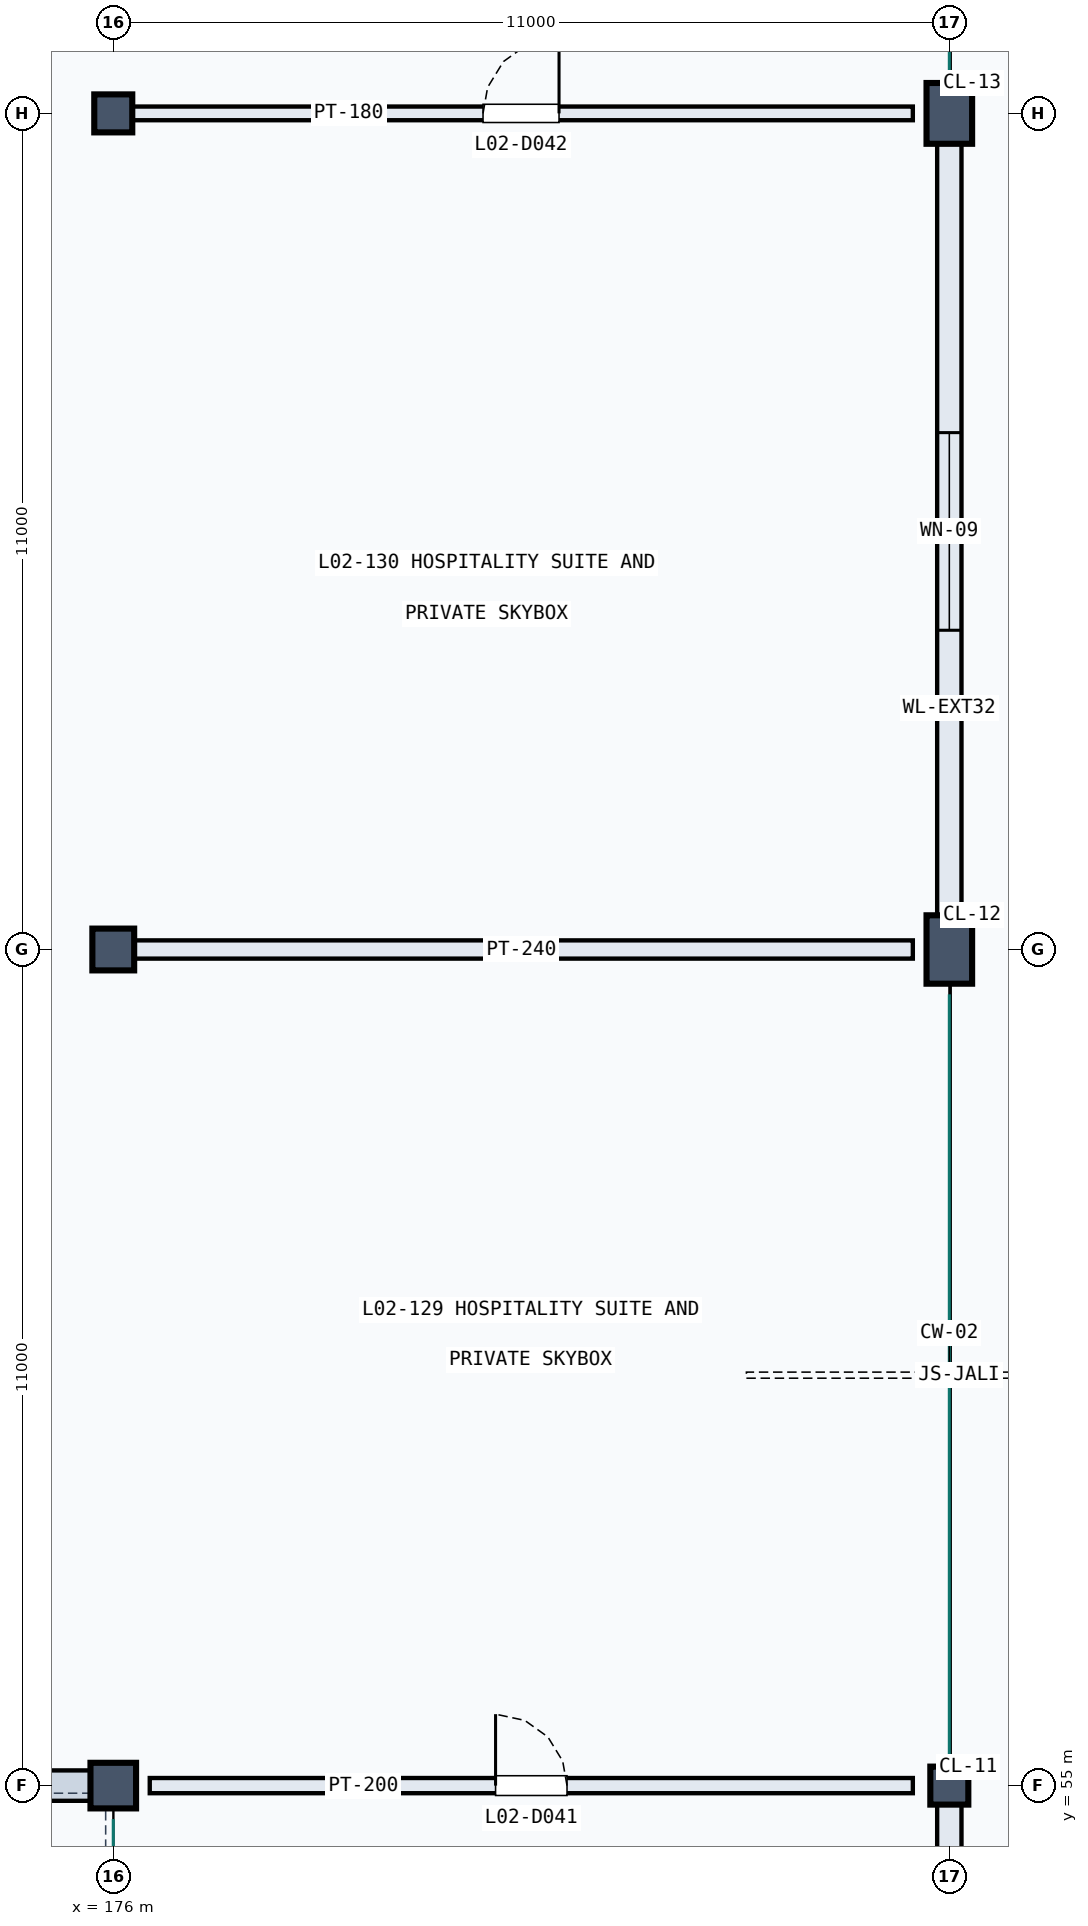
"""IFC4 building model, lengths in metres.
Left out: names, types, materials, properties, quantities, classifications, styles, units other than length and angle.
Written with IfcOpenShell. Run it as: python <this file> out.ifc"""

import sys

from ifc_helpers import new_model, si_unit, direction, frame, frame_2d, origin, origin_2d, place, context, subcontext, project, spatial, rectangle, extrude, element, fill, save


model = new_model("IFC4")
c1 = context("Model", 3, precision=1e-05, world=origin(), true_north=direction((0.0, 1.0)))
c2 = subcontext(c1, "Body", "Model", "MODEL_VIEW")
j1 = project(units=[si_unit("LENGTHUNIT", "METRE"), si_unit("PLANEANGLEUNIT", "RADIAN")], contexts=[c1])
p1 = place(None, origin())
s1 = spatial("IfcSite", under=j1, at=p1, CompositionType="ELEMENT")
p2 = place(p1, origin())
s2 = spatial("IfcBuilding", under=s1, at=p2, CompositionType="ELEMENT")
p3 = place(p2, frame((0.0, 0.0, 10.2)))
s3 = spatial("IfcBuildingStorey", under=s2, at=p3, CompositionType="ELEMENT", Elevation=10.2)
p4 = place(p3, frame((176.0, 55.0, 0.0), z_axis=(0.0, 0.0, 1.0), x_axis=(1.0, 0.0, 0.0)))
e1 = element("IfcColumn", 1, at=p4, inside=s3, PredefinedType="COLUMN", context=c2, shape_type="SweptSolid", body=[
    extrude(rectangle(XDim=0.6, YDim=0.6, at=origin_2d()), origin(), (0.0, 0.0, 1.0), 4.5),
])
p5 = place(p3, frame((176.0, 66.0, 0.0), z_axis=(0.0, 0.0, 1.0), x_axis=(1.0, 0.0, 0.0)))
e2 = element("IfcColumn", 2, at=p5, inside=s3, PredefinedType="COLUMN", context=c2, shape_type="SweptSolid", body=[
    extrude(rectangle(XDim=0.55, YDim=0.55, at=origin_2d()), origin(), (0.0, 0.0, 1.0), 4.5),
])
for number, where, z_axis, x_axis in (
    (3, (176.0, 77.0, 0.0), (0.0, 0.0, 1.0), (1.0, 0.0, 0.0)),
    (4, (187.0, 55.0, 0.0), (0.0, 0.0, 1.0), (1.0, 0.0, 0.0)),
):
    element("IfcColumn", number, at=place(p3, frame(where, z_axis=z_axis, x_axis=x_axis)), inside=s3, PredefinedType="COLUMN", context=c2, shape_type="SweptSolid", body=[
        extrude(rectangle(XDim=0.5, YDim=0.5, at=origin_2d()), origin(), (0.0, 0.0, 1.0), 4.5),
    ])
p6 = place(p3, frame((187.0, 66.0, 0.0), z_axis=(0.0, 0.0, 1.0), x_axis=(1.0, 0.0, 0.0)))
e5 = element("IfcColumn", 5, at=p6, inside=s3, PredefinedType="COLUMN", context=c2, shape_type="SweptSolid", body=[
    extrude(rectangle(XDim=0.6, YDim=0.9, at=origin_2d()), origin(), (0.0, 0.0, 1.0), 4.5),
])
p7 = place(p3, frame((187.0, 77.0, 0.0), z_axis=(0.0, 0.0, 1.0), x_axis=(1.0, 0.0, 0.0)))
e6 = element("IfcColumn", 6, at=p7, inside=s3, PredefinedType="COLUMN", context=c2, shape_type="SweptSolid", body=[
    extrude(rectangle(XDim=0.6, YDim=0.8, at=origin_2d()), origin(), (0.0, 0.0, 1.0), 4.5),
])
p8 = place(p3, frame((164.22, 55.0, 0.0), z_axis=(0.0, 0.0, 1.0), x_axis=(1.0, 0.0, 0.0)))
e7 = element("IfcWall", 7, at=p8, inside=s3, PredefinedType="SOLIDWALL", context=c2, shape_type="SweptSolid", body=[
    extrude(rectangle(XDim=11.56, YDim=0.4, at=frame_2d((5.78, 0.0))), origin(), (0.0, 0.0, 1.0), 3.29),
])
p9 = place(p8, frame((3.178, 0.0, 0.8)))
e8 = element("IfcOpeningElement", 8, at=p9, cuts=e7, PredefinedType="OPENING", context=c2, shape_type="SweptSolid", body=[
    extrude(rectangle(XDim=1.35, YDim=2.1, at=frame_2d((0.675, 1.05))), frame((0.0, 0.21, 0.0), z_axis=(0.0, -1.0, 0.0), x_axis=(1.0, 0.0, 0.0)), (0.0, 0.0, 1.0), 0.42),
])
p10 = place(p8, frame((7.032, 0.0, 0.8)))
e9 = element("IfcOpeningElement", 9, at=p10, cuts=e7, PredefinedType="OPENING", context=c2, shape_type="SweptSolid", body=[
    extrude(rectangle(XDim=1.35, YDim=2.1, at=frame_2d((0.675, 1.05))), frame((0.0, 0.21, 0.0), z_axis=(0.0, -1.0, 0.0), x_axis=(1.0, 0.0, 0.0)), (0.0, 0.0, 1.0), 0.42),
])
p11 = place(p3, frame((187.0, 44.22, 0.0), z_axis=(0.0, 0.0, 1.0), x_axis=(0.0, 1.0, 0.0)))
e10 = element("IfcWall", 10, at=p11, inside=s3, PredefinedType="SOLIDWALL", context=c2, shape_type="SweptSolid", body=[
    extrude(rectangle(XDim=10.57, YDim=0.32, at=frame_2d((5.285, 0.0))), origin(), (0.0, 0.0, 1.0), 4.145),
])
p12 = place(p11, frame((3.685, 0.0, 1.1)))
e11 = element("IfcOpeningElement", 11, at=p12, cuts=e10, PredefinedType="OPENING", context=c2, shape_type="SweptSolid", body=[
    extrude(rectangle(XDim=3.2, YDim=1.4, at=frame_2d((1.6, 0.7))), frame((0.0, 0.17, 0.0), z_axis=(0.0, -1.0, 0.0), x_axis=(1.0, 0.0, 0.0)), (0.0, 0.0, 1.0), 0.34),
])
p13 = place(p3, frame((187.0, 66.22, 0.0), z_axis=(0.0, 0.0, 1.0), x_axis=(0.0, 1.0, 0.0)))
e12 = element("IfcWall", 12, at=p13, inside=s3, PredefinedType="SOLIDWALL", context=c2, shape_type="SweptSolid", body=[
    extrude(rectangle(XDim=10.56, YDim=0.32, at=frame_2d((5.28, 0.0))), origin(), (0.0, 0.0, 1.0), 4.145),
])
p14 = place(p13, frame((3.98, 0.0, 1.1)))
e13 = element("IfcOpeningElement", 13, at=p14, cuts=e12, PredefinedType="OPENING", context=c2, shape_type="SweptSolid", body=[
    extrude(rectangle(XDim=2.6, YDim=1.4, at=frame_2d((1.3, 0.7))), frame((0.0, 0.17, 0.0), z_axis=(0.0, -1.0, 0.0), x_axis=(1.0, 0.0, 0.0)), (0.0, 0.0, 1.0), 0.34),
])
p15 = place(p3, frame((176.48, 55.0, 0.0), z_axis=(0.0, 0.0, 1.0), x_axis=(1.0, 0.0, 0.0)))
e14 = element("IfcWall", 14, at=p15, inside=s3, PredefinedType="PARTITIONING", context=c2, shape_type="SweptSolid", body=[
    extrude(rectangle(XDim=10.04, YDim=0.2, at=frame_2d((5.02, 0.0))), origin(), (0.0, 0.0, 1.0), 4.14),
])
p16 = place(p15, frame((4.55, 0.0, 0.0)))
e15 = element("IfcOpeningElement", 15, at=p16, cuts=e14, PredefinedType="OPENING", context=c2, shape_type="SweptSolid", body=[
    extrude(rectangle(XDim=0.94, YDim=2.15, at=frame_2d((0.47, 1.075))), frame((0.0, 0.11, 0.0), z_axis=(0.0, -1.0, 0.0), x_axis=(1.0, 0.0, 0.0)), (0.0, 0.0, 1.0), 0.22),
])
p17 = place(p3, frame((176.21, 77.0, 0.0), z_axis=(0.0, 0.0, 1.0), x_axis=(1.0, 0.0, 0.0)))
e16 = element("IfcWall", 16, at=p17, inside=s3, PredefinedType="PARTITIONING", context=c2, shape_type="SweptSolid", body=[
    extrude(rectangle(XDim=10.31, YDim=0.18, at=frame_2d((5.155, 0.0))), origin(), (0.0, 0.0, 1.0), 4.14),
])
p18 = place(p17, frame((4.655, 0.0, 0.0)))
e17 = element("IfcOpeningElement", 17, at=p18, cuts=e16, PredefinedType="OPENING", context=c2, shape_type="SweptSolid", body=[
    extrude(rectangle(XDim=1.0, YDim=2.15, at=frame_2d((0.5, 1.075))), frame((0.0, 0.1, 0.0), z_axis=(0.0, -1.0, 0.0), x_axis=(1.0, 0.0, 0.0)), (0.0, 0.0, 1.0), 0.2),
])
p19 = place(p3, frame((176.22, 66.0, 0.0), z_axis=(0.0, 0.0, 1.0), x_axis=(1.0, 0.0, 0.0)))
e18 = element("IfcWall", 18, at=p19, inside=s3, PredefinedType="PARTITIONING", context=c2, shape_type="SweptSolid", body=[
    extrude(rectangle(XDim=10.3, YDim=0.24, at=frame_2d((5.15, 0.0))), origin(), (0.0, 0.0, 1.0), 4.14),
])
p20 = place(p14, origin())
e19 = element("IfcWindow", 19, at=p20, inside=s3, PartitioningType="SINGLE_PANEL", PredefinedType="WINDOW", context=c2, shape_type="SweptSolid", body=[
    extrude(rectangle(XDim=2.6, YDim=1.4, at=frame_2d((1.3, 0.7))), frame((0.0, 0.03, 0.0), z_axis=(0.0, -1.0, 0.0), x_axis=(1.0, 0.0, 0.0)), (0.0, 0.0, 1.0), 0.06),
])
fill(e13, e19)
p21 = place(p16, origin())
e20 = element("IfcDoor", 20, at=p21, inside=s3, OperationType="SINGLE_SWING_LEFT", PredefinedType="DOOR", context=c2, shape_type="SweptSolid", body=[
    extrude(rectangle(XDim=0.94, YDim=2.15, at=frame_2d((0.47, 1.075))), frame((0.0, 0.025, 0.0), z_axis=(0.0, -1.0, 0.0), x_axis=(1.0, 0.0, 0.0)), (0.0, 0.0, 1.0), 0.05),
])
fill(e15, e20)
p22 = place(p18, origin())
e21 = element("IfcDoor", 21, at=p22, inside=s3, OperationType="SINGLE_SWING_RIGHT", PredefinedType="DOOR", context=c2, shape_type="SweptSolid", body=[
    extrude(rectangle(XDim=1.0, YDim=2.15, at=frame_2d((0.5, 1.075))), frame((0.0, 0.025, 0.0), z_axis=(0.0, -1.0, 0.0), x_axis=(1.0, 0.0, 0.0)), (0.0, 0.0, 1.0), 0.05),
])
fill(e17, e21)
save(model, sys.argv[1])
